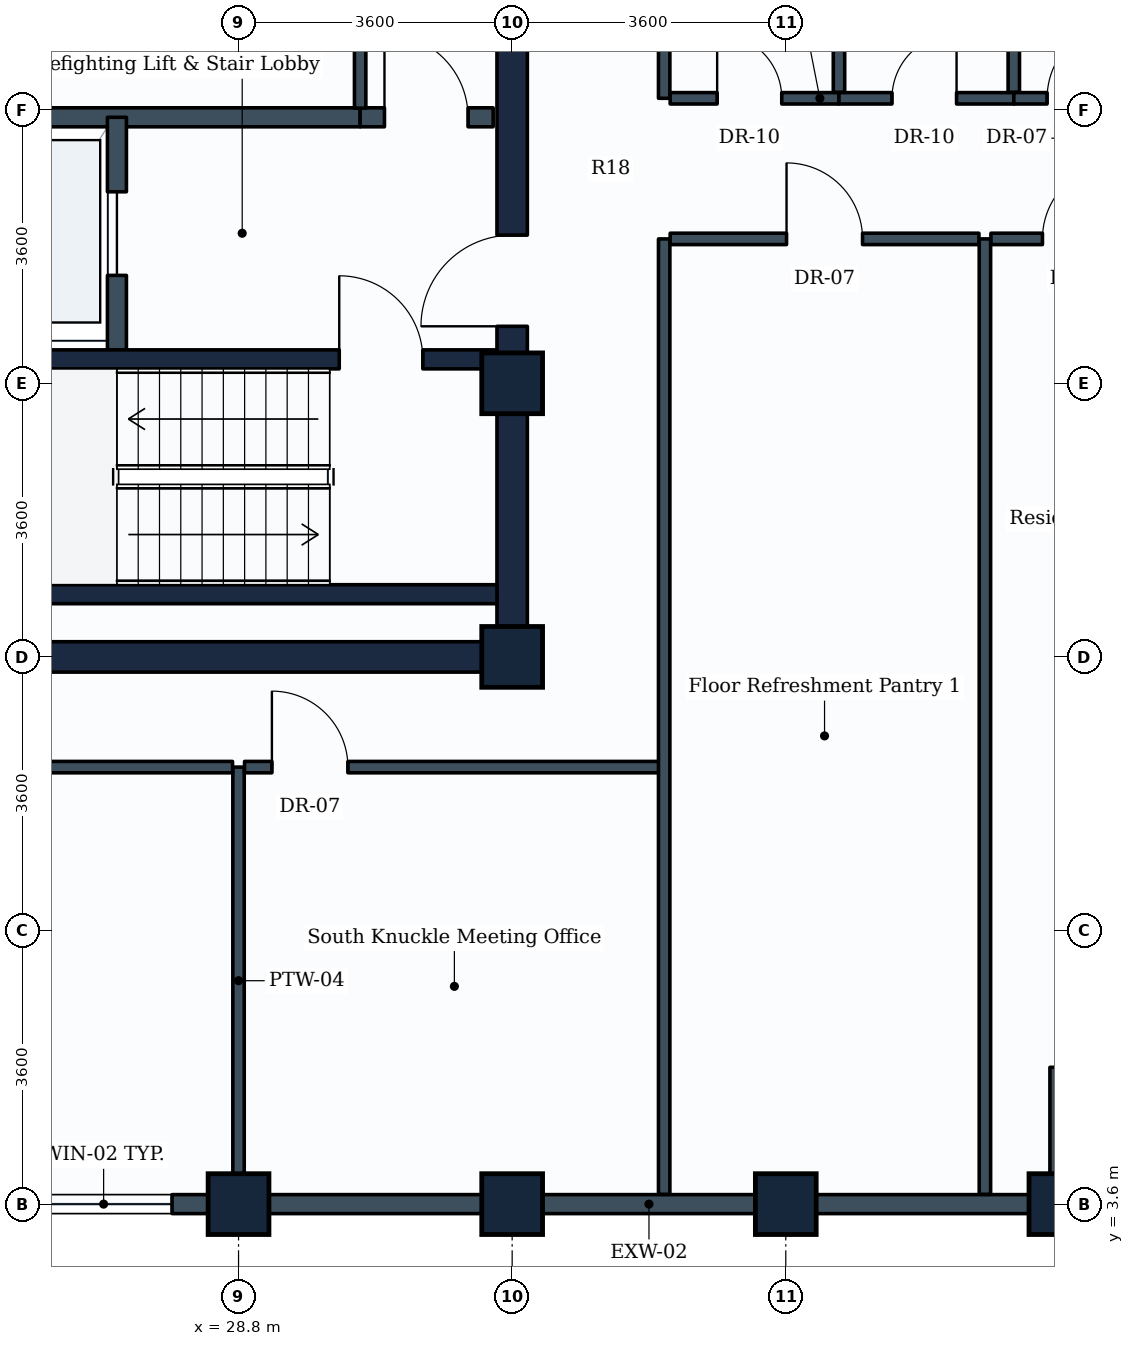
"""IFC4 building model, lengths in metres.
Left out: names, types, materials, properties, quantities, classifications, styles, units other than length and angle.
Written with IfcOpenShell. Run it as: python <this file> out.ifc"""

import sys

from ifc_helpers import new_model, si_unit, direction, frame, frame_2d, origin, origin_2d, place, context, subcontext, project, spatial, rectangle, extrude, element, fill, save


model = new_model("IFC4")
c1 = context("Model", 3, precision=1e-05, world=origin(), true_north=direction((0.0, 1.0)))
c2 = subcontext(c1, "Body", "Model", "MODEL_VIEW")
j1 = project(units=[si_unit("LENGTHUNIT", "METRE"), si_unit("PLANEANGLEUNIT", "RADIAN")], contexts=[c1])
p1 = place(None, origin())
s1 = spatial("IfcSite", under=j1, at=p1, CompositionType="ELEMENT")
p2 = place(p1, origin())
s2 = spatial("IfcBuilding", under=s1, at=p2, CompositionType="ELEMENT")
p3 = place(p2, frame((0.0, 0.0, 266.6)))
s3 = spatial("IfcBuildingStorey", under=s2, at=p3, CompositionType="ELEMENT", Elevation=266.6)
for number, where, z_axis, x_axis in (
    (1, (28.8, 3.6, 0.0), (0.0, 0.0, 1.0), (1.0, 0.0, 0.0)),
    (2, (32.4, 3.6, 0.0), (0.0, 0.0, 1.0), (1.0, 0.0, 0.0)),
    (3, (32.4, 10.8, 0.0), (0.0, 0.0, 1.0), (1.0, 0.0, 0.0)),
    (4, (32.4, 14.4, 0.0), (0.0, 0.0, 1.0), (1.0, 0.0, 0.0)),
    (5, (36.0, 3.6, 0.0), (0.0, 0.0, 1.0), (1.0, 0.0, 0.0)),
    (6, (39.6, 3.6, 0.0), (0.0, 0.0, 1.0), (1.0, 0.0, 0.0)),
):
    element("IfcColumn", number, at=place(p3, frame(where, z_axis=z_axis, x_axis=x_axis)), inside=s3, PredefinedType="COLUMN", context=c2, shape_type="SweptSolid", body=[
        extrude(rectangle(XDim=0.8, YDim=0.8, at=origin_2d()), origin(), (0.0, 0.0, 1.0), 3.6),
    ])
p4 = place(p3, frame((28.8, 3.6, 0.0), z_axis=(0.0, 0.0, 1.0), x_axis=(-1.0, 0.0, 0.0)))
e7 = element("IfcWall", 7, at=p4, inside=s3, PredefinedType="STANDARD", context=c2, shape_type="SweptSolid", body=[
    extrude(rectangle(XDim=3.6, YDim=0.25, at=frame_2d((1.8, 0.0))), origin(), (0.0, 0.0, 1.0), 2.83),
])
p5 = place(p4, frame((0.875, 0.0, 0.85)))
e8 = element("IfcOpeningElement", 8, at=p5, cuts=e7, PredefinedType="OPENING", context=c2, shape_type="SweptSolid", body=[
    extrude(rectangle(XDim=1.8, YDim=1.35, at=frame_2d((0.9, 0.675))), frame((0.0, 0.135, 0.0), z_axis=(0.0, -1.0, 0.0), x_axis=(1.0, 0.0, 0.0)), (0.0, 0.0, 1.0), 0.27),
])
p6 = place(p3, frame((32.4, 3.6, 0.0), z_axis=(0.0, 0.0, 1.0), x_axis=(-1.0, 0.0, 0.0)))
e9 = element("IfcWall", 9, at=p6, inside=s3, PredefinedType="STANDARD", context=c2, shape_type="SweptSolid", body=[
    extrude(rectangle(XDim=3.6, YDim=0.25, at=frame_2d((1.8, 0.0))), origin(), (0.0, 0.0, 1.0), 2.83),
])
for number, where, z_axis, x_axis in (
    (10, (36.0, 3.6, 0.0), (0.0, 0.0, 1.0), (-1.0, 0.0, 0.0)),
    (11, (39.6, 3.6, 0.0), (0.0, 0.0, 1.0), (-1.0, 0.0, 0.0)),
):
    element("IfcWall", number, at=place(p3, frame(where, z_axis=z_axis, x_axis=x_axis)), inside=s3, PredefinedType="STANDARD", context=c2, shape_type="SweptSolid", body=[
        extrude(rectangle(XDim=3.6, YDim=0.25, at=frame_2d((1.8, 0.0))), origin(), (0.0, 0.0, 1.0), 2.83),
    ])
p7 = place(p3, frame((39.6, 5.4, 0.0), z_axis=(0.0, 0.0, 1.0), x_axis=(0.0, -1.0, 0.0)))
e12 = element("IfcWall", 12, at=p7, inside=s3, PredefinedType="STANDARD", context=c2, shape_type="SweptSolid", body=[
    extrude(rectangle(XDim=1.8, YDim=0.25, at=frame_2d((0.9, 0.0))), origin(), (0.0, 0.0, 1.0), 2.83),
])
p8 = place(p3, frame((14.4, 10.8, 0.0), z_axis=(0.0, 0.0, 1.0), x_axis=(1.0, 0.0, 0.0)))
e13 = element("IfcWall", 13, at=p8, inside=s3, PredefinedType="SHEAR", context=c2, shape_type="SweptSolid", body=[
    extrude(rectangle(XDim=18.0, YDim=0.4, at=frame_2d((9.0, 0.0))), origin(), (0.0, 0.0, 1.0), 3.35),
])
p9 = place(p3, frame((32.4, 10.8, 0.0), z_axis=(0.0, 0.0, 1.0), x_axis=(0.0, 1.0, 0.0)))
e14 = element("IfcWall", 14, at=p9, inside=s3, PredefinedType="SHEAR", context=c2, shape_type="SweptSolid", body=[
    extrude(rectangle(XDim=14.4, YDim=0.4, at=frame_2d((7.2, 0.0))), origin(), (0.0, 0.0, 1.0), 3.35),
])
p10 = place(p9, frame((4.35, 0.0, 0.0)))
e15 = element("IfcOpeningElement", 15, at=p10, cuts=e14, PredefinedType="OPENING", context=c2, shape_type="SweptSolid", body=[
    extrude(rectangle(XDim=1.2, YDim=2.1, at=frame_2d((0.6, 1.05))), frame((0.0, 0.21, 0.0), z_axis=(0.0, -1.0, 0.0), x_axis=(1.0, 0.0, 0.0)), (0.0, 0.0, 1.0), 0.42),
])
p11 = place(p9, frame((10.0, 0.0, 0.0)))
e16 = element("IfcOpeningElement", 16, at=p11, cuts=e14, PredefinedType="OPENING", context=c2, shape_type="SweptSolid", body=[
    extrude(rectangle(XDim=1.2, YDim=2.1, at=frame_2d((0.6, 1.05))), frame((0.0, 0.21, 0.0), z_axis=(0.0, -1.0, 0.0), x_axis=(1.0, 0.0, 0.0)), (0.0, 0.0, 1.0), 0.42),
])
p12 = place(p3, frame((23.35, 11.625, 0.0), z_axis=(0.0, 0.0, 1.0), x_axis=(1.0, 0.0, 0.0)))
e17 = element("IfcWall", 17, at=p12, inside=s3, PredefinedType="SHEAR", context=c2, shape_type="SweptSolid", body=[
    extrude(rectangle(XDim=8.85, YDim=0.25, at=frame_2d((4.425, 0.0))), origin(), (0.0, 0.0, 1.0), 3.35),
])
p13 = place(p3, frame((23.35, 14.715, 0.0), z_axis=(0.0, 0.0, 1.0), x_axis=(1.0, 0.0, 0.0)))
e18 = element("IfcWall", 18, at=p13, inside=s3, PredefinedType="SHEAR", context=c2, shape_type="SweptSolid", body=[
    extrude(rectangle(XDim=8.85, YDim=0.25, at=frame_2d((4.425, 0.0))), origin(), (0.0, 0.0, 1.0), 3.35),
])
p14 = place(p13, frame((6.775, 0.0, 0.0)))
e19 = element("IfcOpeningElement", 19, at=p14, cuts=e18, PredefinedType="OPENING", context=c2, shape_type="SweptSolid", body=[
    extrude(rectangle(XDim=1.1, YDim=2.1, at=frame_2d((0.55, 1.05))), frame((0.0, 0.135, 0.0), z_axis=(0.0, -1.0, 0.0), x_axis=(1.0, 0.0, 0.0)), (0.0, 0.0, 1.0), 0.27),
])
p15 = place(p3, frame((21.88, 17.9, 0.0), z_axis=(0.0, 0.0, 1.0), x_axis=(1.0, 0.0, 0.0)))
e20 = element("IfcWall", 20, at=p15, inside=s3, PredefinedType="PARTITIONING", context=c2, shape_type="SweptSolid", body=[
    extrude(rectangle(XDim=8.52, YDim=0.25, at=frame_2d((4.26, 0.0))), origin(), (0.0, 0.0, 1.0), 3.335),
])
p16 = place(p3, frame((30.4, 17.9, 0.0), z_axis=(0.0, 0.0, 1.0), x_axis=(1.0, 0.0, 0.0)))
e21 = element("IfcWall", 21, at=p16, inside=s3, PredefinedType="PARTITIONING", context=c2, shape_type="SweptSolid", body=[
    extrude(rectangle(XDim=1.75, YDim=0.25, at=frame_2d((0.875, 0.0))), origin(), (0.0, 0.0, 1.0), 3.335),
])
p17 = place(p16, frame((0.32, 0.0, 0.0)))
e22 = element("IfcOpeningElement", 22, at=p17, cuts=e21, PredefinedType="OPENING", context=c2, shape_type="SweptSolid", body=[
    extrude(rectangle(XDim=1.1, YDim=2.1, at=frame_2d((0.55, 1.05))), frame((0.0, 0.135, 0.0), z_axis=(0.0, -1.0, 0.0), x_axis=(1.0, 0.0, 0.0)), (0.0, 0.0, 1.0), 0.27),
])
p18 = place(p3, frame((27.2, 14.84, 0.0), z_axis=(0.0, 0.0, 1.0), x_axis=(0.0, 1.0, 0.0)))
e23 = element("IfcWall", 23, at=p18, inside=s3, PredefinedType="PARTITIONING", context=c2, shape_type="SweptSolid", body=[
    extrude(rectangle(XDim=3.06, YDim=0.25, at=frame_2d((1.53, 0.0))), origin(), (0.0, 0.0, 1.0), 3.335),
])
p19 = place(p18, frame((0.98, 0.0, 0.0)))
e24 = element("IfcOpeningElement", 24, at=p19, cuts=e23, PredefinedType="OPENING", context=c2, shape_type="SweptSolid", body=[
    extrude(rectangle(XDim=1.1, YDim=2.1, at=frame_2d((0.55, 1.05))), frame((0.0, 0.135, 0.0), z_axis=(0.0, -1.0, 0.0), x_axis=(1.0, 0.0, 0.0)), (0.0, 0.0, 1.0), 0.27),
])
p20 = place(p3, frame((30.4, 18.02, 0.0), z_axis=(0.0, 0.0, 1.0), x_axis=(0.0, 1.0, 0.0)))
e25 = element("IfcWall", 25, at=p20, inside=s3, PredefinedType="PARTITIONING", context=c2, shape_type="SweptSolid", body=[
    extrude(rectangle(XDim=3.2, YDim=0.15, at=frame_2d((1.6, 0.0))), origin(), (0.0, 0.0, 1.0), 3.335),
])
p21 = place(p3, frame((34.4, 18.15, 0.0), z_axis=(0.0, 0.0, 1.0), x_axis=(0.0, 1.0, 0.0)))
e26 = element("IfcWall", 26, at=p21, inside=s3, PredefinedType="PARTITIONING", context=c2, shape_type="SweptSolid", body=[
    extrude(rectangle(XDim=6.921, YDim=0.15, at=frame_2d((3.46, 0.0))), origin(), (0.0, 0.0, 1.0), 2.83),
])
p22 = place(p3, frame((34.479, 18.15, 0.0), z_axis=(0.0, 0.0, 1.0), x_axis=(1.0, 0.0, 0.0)))
e27 = element("IfcWall", 27, at=p22, inside=s3, PredefinedType="PARTITIONING", context=c2, shape_type="SweptSolid", body=[
    extrude(rectangle(XDim=2.221, YDim=0.15, at=frame_2d((1.11, 0.0))), origin(), (0.0, 0.0, 1.0), 3.02),
])
p23 = place(p22, frame((0.618, 0.0, 0.0)))
e28 = element("IfcOpeningElement", 28, at=p23, cuts=e27, PredefinedType="OPENING", context=c2, shape_type="SweptSolid", body=[
    extrude(rectangle(XDim=0.85, YDim=2.1, at=frame_2d((0.425, 1.05))), frame((0.0, 0.085, 0.0), z_axis=(0.0, -1.0, 0.0), x_axis=(1.0, 0.0, 0.0)), (0.0, 0.0, 1.0), 0.17),
])
p24 = place(p3, frame((36.7, 18.229, 0.0), z_axis=(0.0, 0.0, 1.0), x_axis=(0.0, 1.0, 0.0)))
e29 = element("IfcWall", 29, at=p24, inside=s3, PredefinedType="PARTITIONING", context=c2, shape_type="SweptSolid", body=[
    extrude(rectangle(XDim=6.842, YDim=0.15, at=frame_2d((3.421, 0.0))), origin(), (0.0, 0.0, 1.0), 2.83),
])
p25 = place(p3, frame((36.7, 18.15, 0.0), z_axis=(0.0, 0.0, 1.0), x_axis=(1.0, 0.0, 0.0)))
e30 = element("IfcWall", 30, at=p25, inside=s3, PredefinedType="PARTITIONING", context=c2, shape_type="SweptSolid", body=[
    extrude(rectangle(XDim=2.3, YDim=0.15, at=frame_2d((1.15, 0.0))), origin(), (0.0, 0.0, 1.0), 3.335),
])
p26 = place(p25, frame((0.697, 0.0, 0.0)))
e31 = element("IfcOpeningElement", 31, at=p26, cuts=e30, PredefinedType="OPENING", context=c2, shape_type="SweptSolid", body=[
    extrude(rectangle(XDim=0.85, YDim=2.1, at=frame_2d((0.425, 1.05))), frame((0.0, 0.085, 0.0), z_axis=(0.0, -1.0, 0.0), x_axis=(1.0, 0.0, 0.0)), (0.0, 0.0, 1.0), 0.17),
])
p27 = place(p3, frame((39.0, 18.229, 0.0), z_axis=(0.0, 0.0, 1.0), x_axis=(0.0, 1.0, 0.0)))
e32 = element("IfcWall", 32, at=p27, inside=s3, PredefinedType="PARTITIONING", context=c2, shape_type="SweptSolid", body=[
    extrude(rectangle(XDim=3.821, YDim=0.15, at=frame_2d((1.911, 0.0))), origin(), (0.0, 0.0, 1.0), 3.335),
])
p28 = place(p3, frame((28.8, 9.35, 0.0), z_axis=(0.0, 0.0, 1.0), x_axis=(0.0, -1.0, 0.0)))
e33 = element("IfcWall", 33, at=p28, inside=s3, PredefinedType="PARTITIONING", context=c2, shape_type="SweptSolid", body=[
    extrude(rectangle(XDim=5.621, YDim=0.15, at=frame_2d((2.811, 0.0))), origin(), (0.0, 0.0, 1.0), 3.335),
])
p29 = place(p3, frame((12.95, 9.35, 0.0), z_axis=(0.0, 0.0, 1.0), x_axis=(1.0, 0.0, 0.0)))
e34 = element("IfcWall", 34, at=p29, inside=s3, PredefinedType="PARTITIONING", context=c2, shape_type="SweptSolid", body=[
    extrude(rectangle(XDim=15.771, YDim=0.15, at=frame_2d((7.885, 0.0))), origin(), (0.0, 0.0, 1.0), 3.02),
])
p30 = place(p29, frame((4.836, 0.0, 0.0)))
e35 = element("IfcOpeningElement", 35, at=p30, cuts=e34, PredefinedType="OPENING", context=c2, shape_type="SweptSolid", body=[
    extrude(rectangle(XDim=1.0, YDim=2.1, at=frame_2d((0.5, 1.05))), frame((0.0, 0.085, 0.0), z_axis=(0.0, -1.0, 0.0), x_axis=(1.0, 0.0, 0.0)), (0.0, 0.0, 1.0), 0.17),
])
p31 = place(p3, frame((28.879, 9.35, 0.0), z_axis=(0.0, 0.0, 1.0), x_axis=(1.0, 0.0, 0.0)))
e36 = element("IfcWall", 36, at=p31, inside=s3, PredefinedType="PARTITIONING", context=c2, shape_type="SweptSolid", body=[
    extrude(rectangle(XDim=5.521, YDim=0.15, at=frame_2d((2.76, 0.0))), origin(), (0.0, 0.0, 1.0), 3.335),
])
p32 = place(p31, frame((0.36, 0.0, 0.0)))
e37 = element("IfcOpeningElement", 37, at=p32, cuts=e36, PredefinedType="OPENING", context=c2, shape_type="SweptSolid", body=[
    extrude(rectangle(XDim=1.0, YDim=2.1, at=frame_2d((0.5, 1.05))), frame((0.0, 0.085, 0.0), z_axis=(0.0, -1.0, 0.0), x_axis=(1.0, 0.0, 0.0)), (0.0, 0.0, 1.0), 0.17),
])
for number, where, z_axis, x_axis in (
    (38, (34.4, 3.729, 0.0), (0.0, 0.0, 1.0), (0.0, 1.0, 0.0)),
    (39, (38.62, 3.729, 0.0), (0.0, 0.0, 1.0), (0.0, 1.0, 0.0)),
):
    element("IfcWall", number, at=place(p3, frame(where, z_axis=z_axis, x_axis=x_axis)), inside=s3, PredefinedType="PARTITIONING", context=c2, shape_type="SweptSolid", body=[
        extrude(rectangle(XDim=12.571, YDim=0.15, at=frame_2d((6.286, 0.0))), origin(), (0.0, 0.0, 1.0), 2.83),
    ])
p33 = place(p3, frame((34.479, 16.3, 0.0), z_axis=(0.0, 0.0, 1.0), x_axis=(1.0, 0.0, 0.0)))
e40 = element("IfcWall", 40, at=p33, inside=s3, PredefinedType="PARTITIONING", context=c2, shape_type="SweptSolid", body=[
    extrude(rectangle(XDim=4.062, YDim=0.15, at=frame_2d((2.031, 0.0))), origin(), (0.0, 0.0, 1.0), 3.02),
])
p34 = place(p33, frame((1.531, 0.0, 0.0)))
e41 = element("IfcOpeningElement", 41, at=p34, cuts=e40, PredefinedType="OPENING", context=c2, shape_type="SweptSolid", body=[
    extrude(rectangle(XDim=1.0, YDim=2.1, at=frame_2d((0.5, 1.05))), frame((0.0, 0.085, 0.0), z_axis=(0.0, -1.0, 0.0), x_axis=(1.0, 0.0, 0.0)), (0.0, 0.0, 1.0), 0.17),
])
p35 = place(p3, frame((38.699, 16.3, 0.0), z_axis=(0.0, 0.0, 1.0), x_axis=(1.0, 0.0, 0.0)))
e42 = element("IfcWall", 42, at=p35, inside=s3, PredefinedType="PARTITIONING", context=c2, shape_type="SweptSolid", body=[
    extrude(rectangle(XDim=4.372, YDim=0.15, at=frame_2d((2.186, 0.0))), origin(), (0.0, 0.0, 1.0), 2.83),
])
p36 = place(p35, frame((0.678, 0.0, 0.0)))
e43 = element("IfcOpeningElement", 43, at=p36, cuts=e42, PredefinedType="OPENING", context=c2, shape_type="SweptSolid", body=[
    extrude(rectangle(XDim=1.0, YDim=2.1, at=frame_2d((0.5, 1.05))), frame((0.0, 0.085, 0.0), z_axis=(0.0, -1.0, 0.0), x_axis=(1.0, 0.0, 0.0)), (0.0, 0.0, 1.0), 0.17),
])
p37 = place(p3, frame((39.0, 18.15, 0.0), z_axis=(0.0, 0.0, 1.0), x_axis=(1.0, 0.0, 0.0)))
e44 = element("IfcWall", 44, at=p37, inside=s3, PredefinedType="PARTITIONING", context=c2, shape_type="SweptSolid", body=[
    extrude(rectangle(XDim=4.071, YDim=0.15, at=frame_2d((2.036, 0.0))), origin(), (0.0, 0.0, 1.0), 2.83),
])
p38 = place(p37, frame((0.438, 0.0, 0.0)))
e45 = element("IfcOpeningElement", 45, at=p38, cuts=e44, PredefinedType="OPENING", context=c2, shape_type="SweptSolid", body=[
    extrude(rectangle(XDim=1.0, YDim=2.1, at=frame_2d((0.5, 1.05))), frame((0.0, 0.085, 0.0), z_axis=(0.0, -1.0, 0.0), x_axis=(1.0, 0.0, 0.0)), (0.0, 0.0, 1.0), 0.17),
])
p39 = place(p5, origin())
e46 = element("IfcWindow", 46, at=p39, inside=s3, PartitioningType="SINGLE_PANEL", PredefinedType="WINDOW", context=c2, shape_type="SweptSolid", body=[
    extrude(rectangle(XDim=1.8, YDim=1.35, at=frame_2d((0.9, 0.675))), frame((0.0, 0.03, 0.0), z_axis=(0.0, -1.0, 0.0), x_axis=(1.0, 0.0, 0.0)), (0.0, 0.0, 1.0), 0.06),
])
fill(e8, e46)
p40 = place(p14, origin())
e47 = element("IfcDoor", 47, at=p40, inside=s3, OperationType="SINGLE_SWING_LEFT", PredefinedType="DOOR", context=c2, shape_type="SweptSolid", body=[
    extrude(rectangle(XDim=1.1, YDim=2.1, at=frame_2d((0.55, 1.05))), frame((0.0, 0.025, 0.0), z_axis=(0.0, -1.0, 0.0), x_axis=(1.0, 0.0, 0.0)), (0.0, 0.0, 1.0), 0.05),
])
fill(e19, e47)
p41 = place(p19, origin())
e48 = element("IfcDoor", 48, at=p41, inside=s3, OperationType="SLIDING_TO_LEFT", PredefinedType="DOOR", context=c2, shape_type="SweptSolid", body=[
    extrude(rectangle(XDim=1.1, YDim=2.1, at=frame_2d((0.55, 1.05))), frame((0.0, 0.025, 0.0), z_axis=(0.0, -1.0, 0.0), x_axis=(1.0, 0.0, 0.0)), (0.0, 0.0, 1.0), 0.05),
])
fill(e24, e48)
p42 = place(p10, origin())
e49 = element("IfcDoor", 49, at=p42, inside=s3, OperationType="SINGLE_SWING_LEFT", PredefinedType="DOOR", context=c2, shape_type="SweptSolid", body=[
    extrude(rectangle(XDim=1.2, YDim=2.1, at=frame_2d((0.6, 1.05))), frame((0.0, 0.025, 0.0), z_axis=(0.0, -1.0, 0.0), x_axis=(1.0, 0.0, 0.0)), (0.0, 0.0, 1.0), 0.05),
])
fill(e15, e49)
p43 = place(p17, origin())
e50 = element("IfcDoor", 50, at=p43, inside=s3, OperationType="SINGLE_SWING_LEFT", PredefinedType="DOOR", context=c2, shape_type="SweptSolid", body=[
    extrude(rectangle(XDim=1.1, YDim=2.1, at=frame_2d((0.55, 1.05))), frame((0.0, 0.025, 0.0), z_axis=(0.0, -1.0, 0.0), x_axis=(1.0, 0.0, 0.0)), (0.0, 0.0, 1.0), 0.05),
])
fill(e22, e50)
p44 = place(p23, origin())
e51 = element("IfcDoor", 51, at=p44, inside=s3, OperationType="SINGLE_SWING_LEFT", PredefinedType="DOOR", context=c2, shape_type="SweptSolid", body=[
    extrude(rectangle(XDim=0.85, YDim=2.1, at=frame_2d((0.425, 1.05))), frame((0.0, 0.025, 0.0), z_axis=(0.0, -1.0, 0.0), x_axis=(1.0, 0.0, 0.0)), (0.0, 0.0, 1.0), 0.05),
])
fill(e28, e51)
p45 = place(p26, origin())
e52 = element("IfcDoor", 52, at=p45, inside=s3, OperationType="SINGLE_SWING_RIGHT", PredefinedType="DOOR", context=c2, shape_type="SweptSolid", body=[
    extrude(rectangle(XDim=0.85, YDim=2.1, at=frame_2d((0.425, 1.05))), frame((0.0, 0.025, 0.0), z_axis=(0.0, -1.0, 0.0), x_axis=(1.0, 0.0, 0.0)), (0.0, 0.0, 1.0), 0.05),
])
fill(e31, e52)
p46 = place(p32, origin())
e53 = element("IfcDoor", 53, at=p46, inside=s3, OperationType="SINGLE_SWING_LEFT", PredefinedType="DOOR", context=c2, shape_type="SweptSolid", body=[
    extrude(rectangle(XDim=1.0, YDim=2.1, at=frame_2d((0.5, 1.05))), frame((0.0, 0.025, 0.0), z_axis=(0.0, -1.0, 0.0), x_axis=(1.0, 0.0, 0.0)), (0.0, 0.0, 1.0), 0.05),
])
fill(e37, e53)
p47 = place(p34, origin())
e54 = element("IfcDoor", 54, at=p47, inside=s3, OperationType="SINGLE_SWING_LEFT", PredefinedType="DOOR", context=c2, shape_type="SweptSolid", body=[
    extrude(rectangle(XDim=1.0, YDim=2.1, at=frame_2d((0.5, 1.05))), frame((0.0, 0.025, 0.0), z_axis=(0.0, -1.0, 0.0), x_axis=(1.0, 0.0, 0.0)), (0.0, 0.0, 1.0), 0.05),
])
fill(e41, e54)
p48 = place(p36, origin())
e55 = element("IfcDoor", 55, at=p48, inside=s3, OperationType="SINGLE_SWING_RIGHT", PredefinedType="DOOR", context=c2, shape_type="SweptSolid", body=[
    extrude(rectangle(XDim=1.0, YDim=2.1, at=frame_2d((0.5, 1.05))), frame((0.0, 0.025, 0.0), z_axis=(0.0, -1.0, 0.0), x_axis=(1.0, 0.0, 0.0)), (0.0, 0.0, 1.0), 0.05),
])
fill(e43, e55)
p49 = place(p38, origin())
e56 = element("IfcDoor", 56, at=p49, inside=s3, OperationType="SINGLE_SWING_RIGHT", PredefinedType="DOOR", context=c2, shape_type="SweptSolid", body=[
    extrude(rectangle(XDim=1.0, YDim=2.1, at=frame_2d((0.5, 1.05))), frame((0.0, 0.025, 0.0), z_axis=(0.0, -1.0, 0.0), x_axis=(1.0, 0.0, 0.0)), (0.0, 0.0, 1.0), 0.05),
])
fill(e45, e56)
save(model, sys.argv[1])
